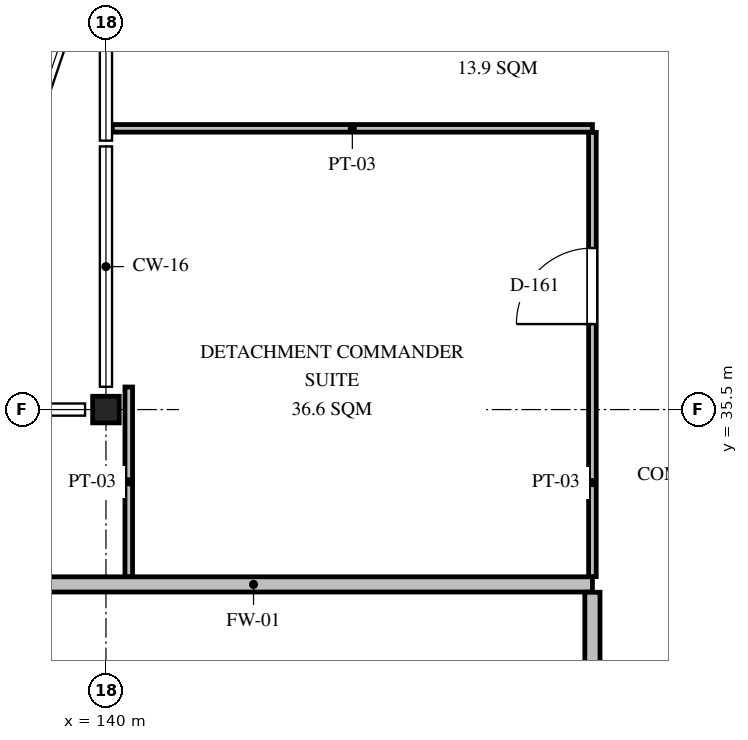
"""IFC4 building model, lengths in metres.
Left out: names, types, materials, properties, quantities, classifications, styles, units other than length and angle.
Written with IfcOpenShell. Run it as: python <this file> out.ifc"""

import sys

from ifc_helpers import new_model, si_unit, direction, frame, frame_2d, origin, origin_2d, place, context, subcontext, project, spatial, rectangle, i_section, extrude, element, fill, save


model = new_model("IFC4")
c1 = context("Model", 3, precision=1e-05, world=origin(), true_north=direction((0.0, 1.0)))
c2 = subcontext(c1, "Body", "Model", "MODEL_VIEW")
j1 = project(units=[si_unit("LENGTHUNIT", "METRE"), si_unit("PLANEANGLEUNIT", "RADIAN")], contexts=[c1])
p1 = place(None, origin())
s1 = spatial("IfcSite", under=j1, at=p1, CompositionType="ELEMENT")
p2 = place(p1, origin())
s2 = spatial("IfcBuilding", under=s1, at=p2, CompositionType="ELEMENT")
p3 = place(p2, frame((0.0, 0.0, 10.05)))
s3 = spatial("IfcBuildingStorey", under=s2, at=p3, CompositionType="ELEMENT", Elevation=10.05)
p4 = place(p3, frame((140.0, 35.5, 0.0), z_axis=(0.0, 0.0, 1.0), x_axis=(1.0, 0.0, 0.0)))
e1 = element("IfcColumn", 1, at=p4, inside=s3, PredefinedType="COLUMN", context=c2, shape_type="SweptSolid", body=[
    extrude(i_section(OverallWidth=0.35, OverallDepth=0.35, WebThickness=0.012, FlangeThickness=0.019, FilletRadius=0.02, at=origin_2d()), origin(), (0.0, 0.0, 1.0), 4.2),
])
p5 = place(p3, frame((137.483, 33.2, 0.0), z_axis=(0.0, 0.0, 1.0), x_axis=(1.0, 0.0, 0.0)))
e2 = element("IfcWall", 2, at=p5, inside=s3, PredefinedType="PARTITIONING", context=c2, shape_type="SweptSolid", body=[
    extrude(rectangle(XDim=8.917, YDim=0.2, at=frame_2d((4.458, 0.0))), origin(), (0.0, 0.0, 1.0), 4.0),
])
p6 = place(p3, frame((146.4, 16.703, 0.0), z_axis=(0.0, 0.0, 1.0), x_axis=(0.0, 1.0, 0.0)))
e3 = element("IfcWall", 3, at=p6, inside=s3, PredefinedType="PARTITIONING", context=c2, shape_type="SweptSolid", body=[
    extrude(rectangle(XDim=16.394, YDim=0.2, at=frame_2d((8.197, 0.0))), origin(), (0.0, 0.0, 1.0), 3.644),
])
p7 = place(p6, frame((7.697, 0.0, 0.0)))
e4 = element("IfcOpeningElement", 4, at=p7, cuts=e3, PredefinedType="OPENING", context=c2, shape_type="SweptSolid", body=[
    extrude(rectangle(XDim=1.0, YDim=2.1, at=frame_2d((0.5, 1.05))), frame((0.0, 0.11, 0.0), z_axis=(0.0, -1.0, 0.0), x_axis=(1.0, 0.0, 0.0)), (0.0, 0.0, 1.0), 0.22),
])
p8 = place(p3, frame((140.083, 39.2, 0.0), z_axis=(0.0, 0.0, 1.0), x_axis=(1.0, 0.0, 0.0)))
e5 = element("IfcWall", 5, at=p8, inside=s3, PredefinedType="PARTITIONING", context=c2, shape_type="SweptSolid", body=[
    extrude(rectangle(XDim=6.317, YDim=0.1, at=frame_2d((3.158, 0.0))), origin(), (0.0, 0.0, 1.0), 4.0),
])
p9 = place(p3, frame((140.3, 33.303, 0.0), z_axis=(0.0, 0.0, 1.0), x_axis=(0.0, 1.0, 0.0)))
e6 = element("IfcWall", 6, at=p9, inside=s3, PredefinedType="PARTITIONING", context=c2, shape_type="SweptSolid", body=[
    extrude(rectangle(XDim=2.494, YDim=0.1, at=frame_2d((1.247, 0.0))), origin(), (0.0, 0.0, 1.0), 3.294),
])
p10 = place(p3, frame((146.4, 33.303, 0.0), z_axis=(0.0, 0.0, 1.0), x_axis=(0.0, 1.0, 0.0)))
e7 = element("IfcWall", 7, at=p10, inside=s3, PredefinedType="PARTITIONING", context=c2, shape_type="SweptSolid", body=[
    extrude(rectangle(XDim=5.844, YDim=0.1, at=frame_2d((2.922, 0.0))), origin(), (0.0, 0.0, 1.0), 3.7),
])
p11 = place(p10, frame((3.322, 0.0, 0.0)))
e8 = element("IfcOpeningElement", 8, at=p11, cuts=e7, PredefinedType="OPENING", context=c2, shape_type="SweptSolid", body=[
    extrude(rectangle(XDim=1.0, YDim=2.1, at=frame_2d((0.5, 1.05))), frame((0.0, 0.06, 0.0), z_axis=(0.0, -1.0, 0.0), x_axis=(1.0, 0.0, 0.0)), (0.0, 0.0, 1.0), 0.12),
])
p12 = place(p11, origin())
e9 = element("IfcDoor", 9, at=p12, inside=s3, OperationType="SINGLE_SWING_LEFT", PredefinedType="DOOR", context=c2, shape_type="SweptSolid", body=[
    extrude(rectangle(XDim=1.0, YDim=2.1, at=frame_2d((0.5, 1.05))), frame((0.0, 0.025, 0.0), z_axis=(0.0, -1.0, 0.0), x_axis=(1.0, 0.0, 0.0)), (0.0, 0.0, 1.0), 0.05),
])
fill(e8, e9)
save(model, sys.argv[1])
